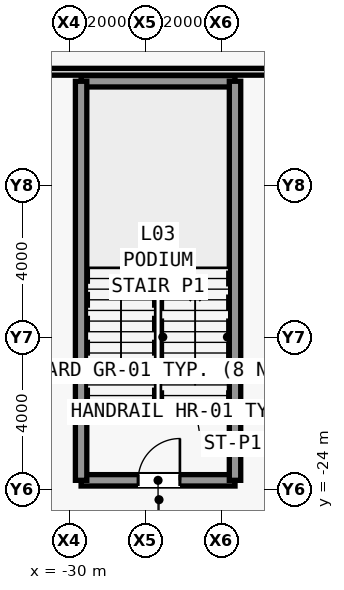
"""IFC4 building model, lengths in metres.
Left out: names, types, materials, properties, quantities, classifications, styles, units other than length and angle.
Written with IfcOpenShell. Run it as: python <this file> out.ifc"""

import sys

from ifc_helpers import new_model, si_unit, direction, frame, frame_2d, origin, place, context, subcontext, project, spatial, rectangle, extrude, source, transform, mapped, element, fill, save


model = new_model("IFC4")
c1 = context("Model", 3, precision=1e-05, world=origin(), true_north=direction((0.0, 1.0)))
c2 = subcontext(c1, "Body", "Model", "MODEL_VIEW")
j1 = project(units=[si_unit("LENGTHUNIT", "METRE"), si_unit("PLANEANGLEUNIT", "RADIAN")], contexts=[c1])
p1 = place(None, origin())
s1 = spatial("IfcSite", under=j1, at=p1, CompositionType="ELEMENT")
p2 = place(p1, origin())
s2 = spatial("IfcBuilding", under=s1, at=p2, CompositionType="ELEMENT")
p3 = place(p2, frame((0.0, 0.0, 17.4)))
s3 = spatial("IfcBuildingStorey", under=s2, at=p3, CompositionType="ELEMENT", Elevation=17.4)
m1 = source(origin(), c2, "Body", "SweptSolid", [
    extrude(rectangle(XDim=4.05, YDim=0.3, at=frame_2d((2.025, 0.0))), origin(), (0.0, 0.0, 1.0), 4.48),
])
p4 = place(p3, frame((-29.7, -23.75, 0.0), z_axis=(0.0, 0.0, 1.0), x_axis=(1.0, 0.0, 0.0)))
e1 = element("IfcWall", 1, at=p4, inside=s3, PredefinedType="SHEAR", context=c2, shape_type="MappedRepresentation", body=[
    mapped(m1, transform((0.0, 0.0, 0.0), scale=1.0)),
])
m2 = source(origin(), c2, "Body", "SweptSolid", [
    extrude(rectangle(XDim=1.1, YDim=2.2, at=frame_2d((0.55, 1.1))), frame((0.0, 0.16, 0.0), z_axis=(0.0, -1.0, 0.0), x_axis=(1.0, 0.0, 0.0)), (0.0, 0.0, 1.0), 0.32),
])
p5 = place(p4, frame((1.5, 0.0, 0.0)))
e2 = element("IfcOpeningElement", 2, at=p5, cuts=e1, PredefinedType="OPENING", context=c2, shape_type="MappedRepresentation", body=[
    mapped(m2, transform((0.0, 0.0, 0.0), scale=1.0)),
])
p6 = place(p3, frame((-29.7, -13.25, 0.0), z_axis=(0.0, 0.0, 1.0), x_axis=(1.0, 0.0, 0.0)))
e3 = element("IfcWall", 3, at=p6, inside=s3, PredefinedType="SHEAR", context=c2, shape_type="MappedRepresentation", body=[
    mapped(m1, transform((0.0, 0.0, 0.0), scale=1.0)),
])
m3 = source(origin(), c2, "Body", "SweptSolid", [
    extrude(rectangle(XDim=10.5, YDim=0.3, at=frame_2d((5.25, 0.0))), origin(), (0.0, 0.0, 1.0), 4.48),
])
for number, where, z_axis, x_axis in (
    (4, (-29.7, -23.75, 0.0), (0.0, 0.0, 1.0), (0.0, 1.0, 0.0)),
    (5, (-25.65, -23.75, 0.0), (0.0, 0.0, 1.0), (0.0, 1.0, 0.0)),
):
    element("IfcWall", number, at=place(p3, frame(where, z_axis=z_axis, x_axis=x_axis)), inside=s3, PredefinedType="SHEAR", context=c2, shape_type="MappedRepresentation", body=[
        mapped(m3, transform((0.0, 0.0, 0.0), scale=1.0)),
    ])
m4 = source(origin(), c2, "Body", "SweptSolid", [
    extrude(rectangle(XDim=21.8, YDim=0.18, at=frame_2d((10.9, 0.0))), origin(), (0.0, 0.0, 1.0), 4.48),
])
p7 = place(p3, frame((-40.0, -13.0, 0.0), z_axis=(0.0, 0.0, 1.0), x_axis=(1.0, 0.0, 0.0)))
e6 = element("IfcWall", 6, at=p7, inside=s3, PredefinedType="PARTITIONING", context=c2, shape_type="MappedRepresentation", body=[
    mapped(m4, transform((0.0, 0.0, 0.0), scale=1.0)),
])
m5 = source(origin(), c2, "Body", "SweptSolid", [
    extrude(rectangle(XDim=1.1, YDim=2.2, at=frame_2d((0.55, 1.1))), frame((0.0, 0.025, 0.0), z_axis=(0.0, -1.0, 0.0), x_axis=(1.0, 0.0, 0.0)), (0.0, 0.0, 1.0), 0.05),
])
p8 = place(p5, origin())
e7 = element("IfcDoor", 7, at=p8, inside=s3, OperationType="SINGLE_SWING_RIGHT", PredefinedType="DOOR", context=c2, shape_type="MappedRepresentation", body=[
    mapped(m5, transform((0.0, 0.0, 0.0), scale=1.0)),
])
fill(e2, e7)
save(model, sys.argv[1])
